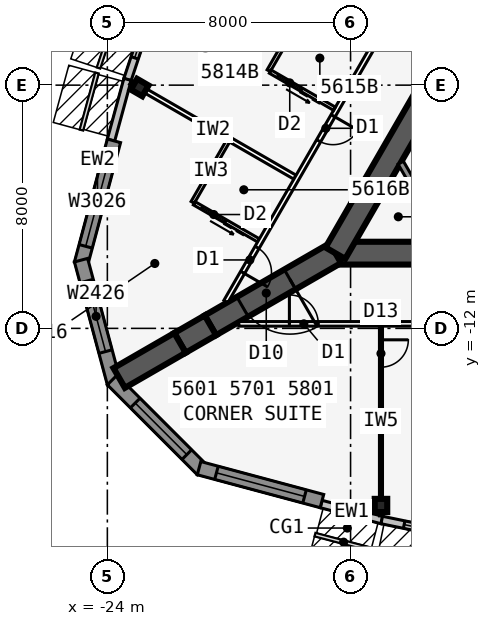
"""IFC4 building model, lengths in metres.
Left out: names, types, materials, properties, quantities, classifications, styles, units other than length and angle.
Written with IfcOpenShell. Run it as: python <this file> out.ifc"""

import sys

from ifc_helpers import new_model, si_unit, direction, frame, frame_2d, origin, origin_2d, place, context, subcontext, project, spatial, polyline, rectangle, i_section, outline, extrude, element, fill, save


model = new_model("IFC4")
c1 = context("Model", 3, precision=1e-05, world=origin(), true_north=direction((0.0, 1.0)))
c2 = subcontext(c1, "Body", "Model", "MODEL_VIEW")
j1 = project(units=[si_unit("LENGTHUNIT", "METRE"), si_unit("PLANEANGLEUNIT", "RADIAN")], contexts=[c1])
p1 = place(None, origin())
s1 = spatial("IfcSite", under=j1, at=p1, CompositionType="ELEMENT")
p2 = place(p1, origin())
s2 = spatial("IfcBuilding", under=s1, at=p2, CompositionType="ELEMENT")
p3 = place(p2, frame((0.0, 0.0, 211.7)))
s3 = spatial("IfcBuildingStorey", under=s2, at=p3, CompositionType="ELEMENT", Elevation=211.7)
p4 = place(p3, frame((-16.5, -9.526, 0.0), z_axis=(0.0, 0.0, 1.0), x_axis=(1.0, 0.0, 0.0)))
e1 = element("IfcWall", 1, at=p4, inside=s3, PredefinedType="SHEAR", context=c2, shape_type="SweptSolid", body=[
    extrude(rectangle(XDim=33.0, YDim=0.75, at=frame_2d((16.5, 0.0))), origin(), (0.0, 0.0, 1.0), 3.6),
])
p5 = place(p4, frame((14.05, 0.0, 0.0)))
e2 = element("IfcOpeningElement", 2, at=p5, cuts=e1, PredefinedType="OPENING", context=c2, shape_type="SweptSolid", body=[
    extrude(rectangle(XDim=1.8, YDim=2.13, at=frame_2d((0.9, 1.065))), frame((0.0, 0.385, 0.0), z_axis=(0.0, -1.0, 0.0), x_axis=(1.0, 0.0, 0.0)), (0.0, 0.0, 1.0), 0.77),
])
p6 = place(p3, frame((0.0, 19.052, 0.0), z_axis=(0.0, 0.0, 1.0), x_axis=(-0.499999749417, -0.866025548458, 0.0)))
e3 = element("IfcWall", 3, at=p6, inside=s3, PredefinedType="SHEAR", context=c2, shape_type="SweptSolid", body=[
    extrude(rectangle(XDim=33.0, YDim=0.75, at=frame_2d((16.5, 0.0))), origin(), (0.0, 0.0, 1.0), 3.6),
])
p7 = place(p6, frame((14.15, 0.0, 0.0)))
e4 = element("IfcOpeningElement", 4, at=p7, cuts=e3, PredefinedType="OPENING", context=c2, shape_type="SweptSolid", body=[
    extrude(rectangle(XDim=1.8, YDim=2.13, at=frame_2d((0.9, 1.065))), frame((0.0, 0.385, 0.0), z_axis=(0.0, -1.0, 0.0), x_axis=(1.0, 0.0, 0.0)), (0.0, 0.0, 1.0), 0.77),
])
p8 = place(p6, frame((12.6, 0.0, 0.0)))
e5 = element("IfcOpeningElement", 5, at=p8, cuts=e3, PredefinedType="OPENING", context=c2, shape_type="SweptSolid", body=[
    extrude(rectangle(XDim=1.0, YDim=2.13, at=frame_2d((0.5, 1.065))), frame((0.0, 0.385, 0.0), z_axis=(0.0, -1.0, 0.0), x_axis=(1.0, 0.0, 0.0)), (0.0, 0.0, 1.0), 0.77),
])
p9 = place(p3, frame((-16.5, -9.526, 0.0), z_axis=(0.0, 0.0, 1.0), x_axis=(-0.866031398331, -0.499989616998, 0.0)))
e6 = element("IfcWall", 6, at=p9, inside=s3, PredefinedType="SHEAR", context=c2, shape_type="SweptSolid", body=[
    extrude(rectangle(XDim=4.746, YDim=0.75, at=frame_2d((2.373, 0.0))), origin(), (0.0, 0.0, 1.0), 3.6),
])
p10 = place(p9, frame((1.725, 0.0, 0.0)))
e7 = element("IfcOpeningElement", 7, at=p10, cuts=e6, PredefinedType="OPENING", context=c2, shape_type="SweptSolid", body=[
    extrude(rectangle(XDim=1.8, YDim=2.13, at=frame_2d((0.9, 1.065))), frame((0.0, 0.385, 0.0), z_axis=(0.0, -1.0, 0.0), x_axis=(1.0, 0.0, 0.0)), (0.0, 0.0, 1.0), 0.77),
])
p11 = place(p3, frame((-20.61, -11.899, 0.0), z_axis=(0.0, 0.0, 1.0), x_axis=(-0.866009537788, -0.500027479704, 0.0)))
e8 = element("IfcWall", 8, at=p11, inside=s3, PredefinedType="SHEAR", context=c2, shape_type="SweptSolid", body=[
    extrude(rectangle(XDim=1.155, YDim=0.75, at=frame_2d((0.577, 0.0))), origin(), (0.0, 0.0, 1.0), 3.6),
])
p12 = place(p3, frame((-21.61, -12.477, 0.0), z_axis=(0.0, 0.0, 1.0), x_axis=(-0.866055313784, -0.499948190782, 0.0)))
e9 = element("IfcWall", 9, at=p12, inside=s3, PredefinedType="SHEAR", context=c2, shape_type="SweptSolid", body=[
    extrude(rectangle(XDim=2.309, YDim=0.75, at=frame_2d((1.155, 0.0))), origin(), (0.0, 0.0, 1.0), 3.6),
])
for number, where, z_axis, x_axis in (
    (10, (-15.0, -17.825, 0.0), (0.0, 0.0, 1.0), (1.0, 0.0, 0.0)),
    (11, (-22.937, -4.078, 0.0), (0.0, 0.0, 1.0), (-0.5, -0.866, 0.0)),
):
    element("IfcColumn", number, at=place(p3, frame(where, z_axis=z_axis, x_axis=x_axis)), inside=s3, PredefinedType="COLUMN", context=c2, shape_type="SweptSolid", body=[
        extrude(i_section(OverallWidth=0.411, OverallDepth=0.434, WebThickness=0.036, FlangeThickness=0.057, at=origin_2d()), origin(), (0.0, 0.0, 1.0), 3.6),
    ])
p13 = place(p3, frame((-16.968, -17.777, 0.0), z_axis=(0.0, 0.0, 1.0), x_axis=(0.967010286052, -0.254737328772, 0.0)))
e12 = element("IfcWall", 12, at=p13, inside=s3, PredefinedType="STANDARD", context=c2, shape_type="SweptSolid", body=[
    extrude(rectangle(XDim=2.068, YDim=0.25, at=frame_2d((1.034, 0.0))), origin(), (0.0, 0.0, 1.0), 3.435),
])
p14 = place(p3, frame((-14.975, -18.302, 0.0), z_axis=(0.0, 0.0, 1.0), x_axis=(0.979461488189, -0.201631329795, 0.0)))
e13 = element("IfcWall", 13, at=p14, inside=s3, PredefinedType="STANDARD", context=c2, shape_type="SweptSolid", body=[
    extrude(rectangle(XDim=5.105, YDim=0.25, at=frame_2d((2.552, 0.0))), origin(), (0.0, 0.0, 1.0), 3.435),
])
p15 = place(p14, frame((0.752, 0.0, 0.45)))
e14 = element("IfcOpeningElement", 14, at=p15, cuts=e13, PredefinedType="OPENING", context=c2, shape_type="SweptSolid", body=[
    extrude(rectangle(XDim=3.6, YDim=2.6, at=frame_2d((1.8, 1.3))), frame((0.0, 0.135, 0.0), z_axis=(0.0, -1.0, 0.0), x_axis=(1.0, 0.0, 0.0)), (0.0, 0.0, 1.0), 0.27),
])
p16 = place(p3, frame((-21.729, 1.028, 0.0), z_axis=(0.0, 0.0, 1.0), x_axis=(-0.315108478109, -0.949055660656, 0.0)))
e15 = element("IfcWall", 15, at=p16, inside=s3, PredefinedType="STANDARD", context=c2, shape_type="SweptSolid", body=[
    extrude(rectangle(XDim=5.105, YDim=0.25, at=frame_2d((2.552, 0.0))), origin(), (0.0, 0.0, 1.0), 3.435),
])
p17 = place(p16, frame((0.752, 0.0, 0.45)))
e16 = element("IfcOpeningElement", 16, at=p17, cuts=e15, PredefinedType="OPENING", context=c2, shape_type="SweptSolid", body=[
    extrude(rectangle(XDim=3.6, YDim=2.6, at=frame_2d((1.8, 1.3))), frame((0.0, 0.135, 0.0), z_axis=(0.0, -1.0, 0.0), x_axis=(1.0, 0.0, 0.0)), (0.0, 0.0, 1.0), 0.27),
])
p18 = place(p3, frame((-23.336, -3.811, 0.0), z_axis=(0.0, 0.0, 1.0), x_axis=(-0.262867703986, -0.964831887015, 0.0)))
e17 = element("IfcWall", 17, at=p18, inside=s3, PredefinedType="STANDARD", context=c2, shape_type="SweptSolid", body=[
    extrude(rectangle(XDim=2.068, YDim=0.25, at=frame_2d((1.034, 0.0))), origin(), (0.0, 0.0, 1.0), 3.435),
])
p19 = place(p3, frame((-23.783, -5.832, 0.0), z_axis=(0.0, 0.0, 1.0), x_axis=(-0.258784695888, -0.965935029479, 0.0)))
e18 = element("IfcWall", 18, at=p19, inside=s3, PredefinedType="SOLIDWALL", context=c2, shape_type="SweptSolid", body=[
    extrude(rectangle(XDim=4.184, YDim=0.45, at=frame_2d((2.092, 0.0))), origin(), (0.0, 0.0, 1.0), 3.435),
])
p20 = place(p19, frame((0.592, 0.0, 0.45)))
e19 = element("IfcOpeningElement", 19, at=p20, cuts=e18, PredefinedType="OPENING", context=c2, shape_type="SweptSolid", body=[
    extrude(rectangle(XDim=3.0, YDim=2.6, at=frame_2d((1.5, 1.3))), frame((0.0, 0.235, 0.0), z_axis=(0.0, -1.0, 0.0), x_axis=(1.0, 0.0, 0.0)), (0.0, 0.0, 1.0), 0.47),
])
p21 = place(p3, frame((-24.865, -9.757, 0.0), z_axis=(0.0, 0.0, 1.0), x_axis=(0.258799282522, -0.96593112144, 0.0)))
e20 = element("IfcWall", 20, at=p21, inside=s3, PredefinedType="SOLIDWALL", context=c2, shape_type="SweptSolid", body=[
    extrude(outline(polyline([(4.184, 0.225), (4.125, 0.225), (3.705, 0.113), (3.675, 0.225), (0.0, 0.225), (0.0, -0.225), (4.184, -0.225), (4.184, 0.225)])), origin(), (0.0, 0.0, 1.0), 3.435),
])
p22 = place(p21, frame((0.713, 0.0, 0.45)))
e21 = element("IfcOpeningElement", 21, at=p22, cuts=e20, PredefinedType="OPENING", context=c2, shape_type="SweptSolid", body=[
    extrude(rectangle(XDim=2.4, YDim=2.6, at=frame_2d((1.2, 1.3))), frame((0.0, 0.235, 0.0), z_axis=(0.0, -1.0, 0.0), x_axis=(1.0, 0.0, 0.0)), (0.0, 0.0, 1.0), 0.47),
])
p23 = place(p3, frame((-23.841, -13.697, 0.0), z_axis=(0.0, 0.0, 1.0), x_axis=(0.707077605902, -0.707135955267, 0.0)))
e22 = element("IfcWall", 22, at=p23, inside=s3, PredefinedType="SOLIDWALL", context=c2, shape_type="SweptSolid", body=[
    extrude(outline(polyline([(4.184, 0.225), (0.509, 0.225), (0.479, 0.113), (0.059, 0.225), (0.0, 0.225), (0.0, -0.225), (4.184, -0.225), (4.184, 0.225)])), origin(), (0.0, 0.0, 1.0), 3.435),
])
p24 = place(p23, frame((1.071, 0.0, 0.45)))
e23 = element("IfcOpeningElement", 23, at=p24, cuts=e22, PredefinedType="OPENING", context=c2, shape_type="SweptSolid", body=[
    extrude(rectangle(XDim=2.4, YDim=2.6, at=frame_2d((1.2, 1.3))), frame((0.0, 0.235, 0.0), z_axis=(0.0, -1.0, 0.0), x_axis=(1.0, 0.0, 0.0)), (0.0, 0.0, 1.0), 0.47),
])
p25 = place(p3, frame((-20.983, -16.598, 0.0), z_axis=(0.0, 0.0, 1.0), x_axis=(0.965920442324, -0.258839137498, 0.0)))
e24 = element("IfcWall", 24, at=p25, inside=s3, PredefinedType="SOLIDWALL", context=c2, shape_type="SweptSolid", body=[
    extrude(rectangle(XDim=4.184, YDim=0.45, at=frame_2d((2.092, 0.0))), origin(), (0.0, 0.0, 1.0), 3.435),
])
p26 = place(p25, frame((0.592, 0.0, 0.45)))
e25 = element("IfcOpeningElement", 25, at=p26, cuts=e24, PredefinedType="OPENING", context=c2, shape_type="SweptSolid", body=[
    extrude(rectangle(XDim=3.0, YDim=2.6, at=frame_2d((1.5, 1.3))), frame((0.0, 0.235, 0.0), z_axis=(0.0, -1.0, 0.0), x_axis=(1.0, 0.0, 0.0)), (0.0, 0.0, 1.0), 0.47),
])
p27 = place(p3, frame((-19.677, -11.851, 0.0), z_axis=(0.0, 0.0, 1.0), x_axis=(1.0, 0.0, 0.0)))
e26 = element("IfcWall", 26, at=p27, inside=s3, PredefinedType="PARTITIONING", context=c2, shape_type="SweptSolid", body=[
    extrude(rectangle(XDim=39.354, YDim=0.15, at=frame_2d((19.677, 0.0))), origin(), (0.0, 0.0, 1.0), 3.435),
])
p28 = place(p27, frame((1.665, 0.0, 0.0)))
e27 = element("IfcOpeningElement", 27, at=p28, cuts=e26, PredefinedType="OPENING", context=c2, shape_type="SweptSolid", body=[
    extrude(rectangle(XDim=0.95, YDim=2.13, at=frame_2d((0.475, 1.065))), frame((0.0, 0.085, 0.0), z_axis=(0.0, -1.0, 0.0), x_axis=(1.0, 0.0, 0.0)), (0.0, 0.0, 1.0), 0.17),
])
p29 = place(p27, frame((11.702, 0.0, 0.0)))
e28 = element("IfcOpeningElement", 28, at=p29, cuts=e26, PredefinedType="OPENING", context=c2, shape_type="SweptSolid", body=[
    extrude(rectangle(XDim=0.95, YDim=2.13, at=frame_2d((0.475, 1.065))), frame((0.0, 0.085, 0.0), z_axis=(0.0, -1.0, 0.0), x_axis=(1.0, 0.0, 0.0)), (0.0, 0.0, 1.0), 0.17),
])
p30 = place(p27, frame((21.677, 0.0, 0.0)))
e29 = element("IfcOpeningElement", 29, at=p30, cuts=e26, PredefinedType="OPENING", context=c2, shape_type="SweptSolid", body=[
    extrude(rectangle(XDim=1.0, YDim=2.13, at=frame_2d((0.5, 1.065))), frame((0.0, 0.085, 0.0), z_axis=(0.0, -1.0, 0.0), x_axis=(1.0, 0.0, 0.0)), (0.0, 0.0, 1.0), 0.17),
])
p31 = place(p27, frame((26.102, 0.0, 0.0)))
e30 = element("IfcOpeningElement", 30, at=p31, cuts=e26, PredefinedType="OPENING", context=c2, shape_type="SweptSolid", body=[
    extrude(rectangle(XDim=0.95, YDim=2.13, at=frame_2d((0.475, 1.065))), frame((0.0, 0.085, 0.0), z_axis=(0.0, -1.0, 0.0), x_axis=(1.0, 0.0, 0.0)), (0.0, 0.0, 1.0), 0.17),
])
p32 = place(p27, frame((36.739, 0.0, 0.0)))
e31 = element("IfcOpeningElement", 31, at=p32, cuts=e26, PredefinedType="OPENING", context=c2, shape_type="SweptSolid", body=[
    extrude(rectangle(XDim=0.95, YDim=2.13, at=frame_2d((0.475, 1.065))), frame((0.0, 0.085, 0.0), z_axis=(0.0, -1.0, 0.0), x_axis=(1.0, 0.0, 0.0)), (0.0, 0.0, 1.0), 0.17),
])
p33 = place(p3, frame((-15.0, -11.926, 0.0), z_axis=(0.0, 0.0, 1.0), x_axis=(0.0, -1.0, 0.0)))
e32 = element("IfcWall", 32, at=p33, inside=s3, PredefinedType="PARTITIONING", context=c2, shape_type="SweptSolid", body=[
    extrude(rectangle(XDim=6.24, YDim=0.1, at=frame_2d((3.12, 0.0))), origin(), (0.0, 0.0, 1.0), 2.589),
])
p34 = place(p33, frame((0.45, 0.0, 0.0)))
e33 = element("IfcOpeningElement", 33, at=p34, cuts=e32, PredefinedType="OPENING", context=c2, shape_type="SweptSolid", body=[
    extrude(rectangle(XDim=0.9, YDim=2.13, at=frame_2d((0.45, 1.065))), frame((0.0, 0.06, 0.0), z_axis=(0.0, -1.0, 0.0), x_axis=(1.0, 0.0, 0.0)), (0.0, 0.0, 1.0), 0.12),
])
p35 = place(p3, frame((-0.425, 22.966, 0.0), z_axis=(0.0, 0.0, 1.0), x_axis=(-0.500000265775, -0.866025250339, 0.0)))
e34 = element("IfcWall", 34, at=p35, inside=s3, PredefinedType="PARTITIONING", context=c2, shape_type="SweptSolid", body=[
    extrude(rectangle(XDim=39.354, YDim=0.15, at=frame_2d((19.677, 0.0))), origin(), (0.0, 0.0, 1.0), 3.435),
])
p36 = place(p35, frame((1.102, 0.0, 0.0)))
e35 = element("IfcOpeningElement", 35, at=p36, cuts=e34, PredefinedType="OPENING", context=c2, shape_type="SweptSolid", body=[
    extrude(rectangle(XDim=0.95, YDim=2.13, at=frame_2d((0.475, 1.065))), frame((0.0, 0.085, 0.0), z_axis=(0.0, -1.0, 0.0), x_axis=(1.0, 0.0, 0.0)), (0.0, 0.0, 1.0), 0.17),
])
p37 = place(p35, frame((6.702, 0.0, 0.0)))
e36 = element("IfcOpeningElement", 36, at=p37, cuts=e34, PredefinedType="OPENING", context=c2, shape_type="SweptSolid", body=[
    extrude(rectangle(XDim=0.95, YDim=2.13, at=frame_2d((0.475, 1.065))), frame((0.0, 0.085, 0.0), z_axis=(0.0, -1.0, 0.0), x_axis=(1.0, 0.0, 0.0)), (0.0, 0.0, 1.0), 0.17),
])
p38 = place(p35, frame((16.702, 0.0, 0.0)))
e37 = element("IfcOpeningElement", 37, at=p38, cuts=e34, PredefinedType="OPENING", context=c2, shape_type="SweptSolid", body=[
    extrude(rectangle(XDim=0.95, YDim=2.13, at=frame_2d((0.475, 1.065))), frame((0.0, 0.085, 0.0), z_axis=(0.0, -1.0, 0.0), x_axis=(1.0, 0.0, 0.0)), (0.0, 0.0, 1.0), 0.17),
])
p39 = place(p35, frame((26.102, 0.0, 0.0)))
e38 = element("IfcOpeningElement", 38, at=p39, cuts=e34, PredefinedType="OPENING", context=c2, shape_type="SweptSolid", body=[
    extrude(rectangle(XDim=0.95, YDim=2.13, at=frame_2d((0.475, 1.065))), frame((0.0, 0.085, 0.0), z_axis=(0.0, -1.0, 0.0), x_axis=(1.0, 0.0, 0.0)), (0.0, 0.0, 1.0), 0.17),
])
p40 = place(p35, frame((32.302, 0.0, 0.0)))
e39 = element("IfcOpeningElement", 39, at=p40, cuts=e34, PredefinedType="OPENING", context=c2, shape_type="SweptSolid", body=[
    extrude(rectangle(XDim=0.95, YDim=2.13, at=frame_2d((0.475, 1.065))), frame((0.0, 0.085, 0.0), z_axis=(0.0, -1.0, 0.0), x_axis=(1.0, 0.0, 0.0)), (0.0, 0.0, 1.0), 0.17),
])
p41 = place(p35, frame((37.302, 0.0, 0.0)))
e40 = element("IfcOpeningElement", 40, at=p41, cuts=e34, PredefinedType="OPENING", context=c2, shape_type="SweptSolid", body=[
    extrude(rectangle(XDim=0.95, YDim=2.13, at=frame_2d((0.475, 1.065))), frame((0.0, 0.085, 0.0), z_axis=(0.0, -1.0, 0.0), x_axis=(1.0, 0.0, 0.0)), (0.0, 0.0, 1.0), 0.17),
])
p42 = place(p3, frame((-17.829, -7.027, 0.0), z_axis=(0.0, 0.0, 1.0), x_axis=(-0.866026604282, 0.499997920671, 0.0)))
e41 = element("IfcWall", 41, at=p42, inside=s3, PredefinedType="PARTITIONING", context=c2, shape_type="SweptSolid", body=[
    extrude(rectangle(XDim=6.24, YDim=0.15, at=frame_2d((3.12, 0.0))), origin(), (0.0, 0.0, 1.0), 2.589),
])
p43 = place(p3, frame((-17.493, -1.447, 0.0), z_axis=(0.0, 0.0, 1.0), x_axis=(-0.500033551112, -0.866006032174, 0.0)))
e42 = element("IfcWall", 42, at=p43, inside=s3, PredefinedType="PLUMBINGWALL", context=c2, shape_type="SweptSolid", body=[
    extrude(rectangle(XDim=2.4, YDim=0.12, at=frame_2d((1.2, 0.0))), origin(), (0.0, 0.0, 1.0), 3.435),
])
p44 = place(p3, frame((-16.529, -4.776, 0.0), z_axis=(0.0, 0.0, 1.0), x_axis=(-0.866023955769, 0.500002508028, 0.0)))
e43 = element("IfcWall", 43, at=p44, inside=s3, PredefinedType="PLUMBINGWALL", context=c2, shape_type="SweptSolid", body=[
    extrude(rectangle(XDim=2.44, YDim=0.12, at=frame_2d((1.22, 0.0))), origin(), (0.0, 0.0, 1.0), 3.435),
])
p45 = place(p44, frame((1.25, 0.0, 0.0)))
e44 = element("IfcOpeningElement", 44, at=p45, cuts=e43, PredefinedType="OPENING", context=c2, shape_type="SweptSolid", body=[
    extrude(rectangle(XDim=0.9, YDim=2.13, at=frame_2d((0.45, 1.065))), frame((0.0, 0.07, 0.0), z_axis=(0.0, -1.0, 0.0), x_axis=(1.0, 0.0, 0.0)), (0.0, 0.0, 1.0), 0.14),
])
p46 = place(p3, frame((-19.993, -5.777, 0.0), z_axis=(0.0, 0.0, 1.0), x_axis=(-0.500033551112, -0.866006032174, 0.0)))
e45 = element("IfcWall", 45, at=p46, inside=s3, PredefinedType="PLUMBINGWALL", context=c2, shape_type="SweptSolid", body=[
    extrude(rectangle(XDim=2.4, YDim=0.12, at=frame_2d((1.2, 0.0))), origin(), (0.0, 0.0, 1.0), 3.435),
])
p47 = place(p3, frame((-19.029, -9.106, 0.0), z_axis=(0.0, 0.0, 1.0), x_axis=(-0.866023955769, 0.500002508028, 0.0)))
e46 = element("IfcWall", 46, at=p47, inside=s3, PredefinedType="PLUMBINGWALL", context=c2, shape_type="SweptSolid", body=[
    extrude(rectangle(XDim=2.44, YDim=0.12, at=frame_2d((1.22, 0.0))), origin(), (0.0, 0.0, 1.0), 3.435),
])
p48 = place(p47, frame((1.25, 0.0, 0.0)))
e47 = element("IfcOpeningElement", 47, at=p48, cuts=e46, PredefinedType="OPENING", context=c2, shape_type="SweptSolid", body=[
    extrude(rectangle(XDim=0.9, YDim=2.13, at=frame_2d((0.45, 1.065))), frame((0.0, 0.07, 0.0), z_axis=(0.0, -1.0, 0.0), x_axis=(1.0, 0.0, 0.0)), (0.0, 0.0, 1.0), 0.14),
])
p49 = place(p3, frame((-12.848, -9.151, 0.0), z_axis=(0.0, 0.0, 1.0), x_axis=(-0.499952404951, 0.866052881055, 0.0)))
e48 = element("IfcWall", 48, at=p49, inside=s3, PredefinedType="SOLIDWALL", context=c2, shape_type="SweptSolid", body=[
    extrude(rectangle(XDim=3.002, YDim=0.2, at=frame_2d((1.501, 0.0))), origin(), (0.0, 0.0, 1.0), 3.435),
])
p50 = place(p15, origin())
e49 = element("IfcWindow", 49, at=p50, inside=s3, PartitioningType="SINGLE_PANEL", PredefinedType="WINDOW", context=c2, shape_type="SweptSolid", body=[
    extrude(rectangle(XDim=3.6, YDim=2.6, at=frame_2d((1.8, 1.3))), frame((0.0, 0.03, 0.0), z_axis=(0.0, -1.0, 0.0), x_axis=(1.0, 0.0, 0.0)), (0.0, 0.0, 1.0), 0.06),
])
fill(e14, e49)
p51 = place(p17, origin())
e50 = element("IfcWindow", 50, at=p51, inside=s3, PartitioningType="SINGLE_PANEL", PredefinedType="WINDOW", context=c2, shape_type="SweptSolid", body=[
    extrude(rectangle(XDim=3.6, YDim=2.6, at=frame_2d((1.8, 1.3))), frame((0.0, 0.03, 0.0), z_axis=(0.0, -1.0, 0.0), x_axis=(1.0, 0.0, 0.0)), (0.0, 0.0, 1.0), 0.06),
])
fill(e16, e50)
p52 = place(p20, origin())
e51 = element("IfcWindow", 51, at=p52, inside=s3, PartitioningType="SINGLE_PANEL", PredefinedType="WINDOW", context=c2, shape_type="SweptSolid", body=[
    extrude(rectangle(XDim=3.0, YDim=2.6, at=frame_2d((1.5, 1.3))), frame((0.0, 0.03, 0.0), z_axis=(0.0, -1.0, 0.0), x_axis=(1.0, 0.0, 0.0)), (0.0, 0.0, 1.0), 0.06),
])
fill(e19, e51)
p53 = place(p22, origin())
e52 = element("IfcWindow", 52, at=p53, inside=s3, PartitioningType="SINGLE_PANEL", PredefinedType="WINDOW", context=c2, shape_type="SweptSolid", body=[
    extrude(rectangle(XDim=2.4, YDim=2.6, at=frame_2d((1.2, 1.3))), frame((0.0, 0.03, 0.0), z_axis=(0.0, -1.0, 0.0), x_axis=(1.0, 0.0, 0.0)), (0.0, 0.0, 1.0), 0.06),
])
fill(e21, e52)
p54 = place(p24, origin())
e53 = element("IfcWindow", 53, at=p54, inside=s3, PartitioningType="SINGLE_PANEL", PredefinedType="WINDOW", context=c2, shape_type="SweptSolid", body=[
    extrude(rectangle(XDim=2.4, YDim=2.6, at=frame_2d((1.2, 1.3))), frame((0.0, 0.03, 0.0), z_axis=(0.0, -1.0, 0.0), x_axis=(1.0, 0.0, 0.0)), (0.0, 0.0, 1.0), 0.06),
])
fill(e23, e53)
p55 = place(p26, origin())
e54 = element("IfcWindow", 54, at=p55, inside=s3, PartitioningType="SINGLE_PANEL", PredefinedType="WINDOW", context=c2, shape_type="SweptSolid", body=[
    extrude(rectangle(XDim=3.0, YDim=2.6, at=frame_2d((1.5, 1.3))), frame((0.0, 0.03, 0.0), z_axis=(0.0, -1.0, 0.0), x_axis=(1.0, 0.0, 0.0)), (0.0, 0.0, 1.0), 0.06),
])
fill(e25, e54)
p56 = place(p34, origin())
e55 = element("IfcDoor", 55, at=p56, inside=s3, OperationType="SINGLE_SWING_LEFT", PredefinedType="DOOR", context=c2, shape_type="SweptSolid", body=[
    extrude(rectangle(XDim=0.9, YDim=2.13, at=frame_2d((0.45, 1.065))), frame((0.0, 0.025, 0.0), z_axis=(0.0, -1.0, 0.0), x_axis=(1.0, 0.0, 0.0)), (0.0, 0.0, 1.0), 0.05),
])
fill(e33, e55)
p57 = place(p28, origin())
e56 = element("IfcDoor", 56, at=p57, inside=s3, OperationType="SINGLE_SWING_LEFT", PredefinedType="DOOR", context=c2, shape_type="SweptSolid", body=[
    extrude(rectangle(XDim=0.95, YDim=2.13, at=frame_2d((0.475, 1.065))), frame((0.0, 0.025, 0.0), z_axis=(0.0, -1.0, 0.0), x_axis=(1.0, 0.0, 0.0)), (0.0, 0.0, 1.0), 0.05),
])
fill(e27, e56)
p58 = place(p45, origin())
e57 = element("IfcDoor", 57, at=p58, inside=s3, OperationType="SLIDING_TO_LEFT", PredefinedType="DOOR", context=c2, shape_type="SweptSolid", body=[
    extrude(rectangle(XDim=0.9, YDim=2.13, at=frame_2d((0.45, 1.065))), frame((0.0, 0.025, 0.0), z_axis=(0.0, -1.0, 0.0), x_axis=(1.0, 0.0, 0.0)), (0.0, 0.0, 1.0), 0.05),
])
fill(e44, e57)
p59 = place(p40, origin())
e58 = element("IfcDoor", 58, at=p59, inside=s3, OperationType="SINGLE_SWING_LEFT", PredefinedType="DOOR", context=c2, shape_type="SweptSolid", body=[
    extrude(rectangle(XDim=0.95, YDim=2.13, at=frame_2d((0.475, 1.065))), frame((0.0, 0.025, 0.0), z_axis=(0.0, -1.0, 0.0), x_axis=(1.0, 0.0, 0.0)), (0.0, 0.0, 1.0), 0.05),
])
fill(e39, e58)
p60 = place(p48, origin())
e59 = element("IfcDoor", 59, at=p60, inside=s3, OperationType="SLIDING_TO_LEFT", PredefinedType="DOOR", context=c2, shape_type="SweptSolid", body=[
    extrude(rectangle(XDim=0.9, YDim=2.13, at=frame_2d((0.45, 1.065))), frame((0.0, 0.025, 0.0), z_axis=(0.0, -1.0, 0.0), x_axis=(1.0, 0.0, 0.0)), (0.0, 0.0, 1.0), 0.05),
])
fill(e47, e59)
p61 = place(p41, origin())
e60 = element("IfcDoor", 60, at=p61, inside=s3, OperationType="SINGLE_SWING_RIGHT", PredefinedType="DOOR", context=c2, shape_type="SweptSolid", body=[
    extrude(rectangle(XDim=0.95, YDim=2.13, at=frame_2d((0.475, 1.065))), frame((0.0, 0.025, 0.0), z_axis=(0.0, -1.0, 0.0), x_axis=(1.0, 0.0, 0.0)), (0.0, 0.0, 1.0), 0.05),
])
fill(e40, e60)
p62 = place(p10, origin())
e61 = element("IfcDoor", 61, at=p62, inside=s3, OperationType="DOUBLE_DOOR_DOUBLE_SWING", PredefinedType="DOOR", context=c2, shape_type="SweptSolid", body=[
    extrude(rectangle(XDim=1.8, YDim=2.13, at=frame_2d((0.9, 1.065))), frame((0.0, 0.025, 0.0), z_axis=(0.0, -1.0, 0.0), x_axis=(1.0, 0.0, 0.0)), (0.0, 0.0, 1.0), 0.05),
])
fill(e7, e61)
save(model, sys.argv[1])
